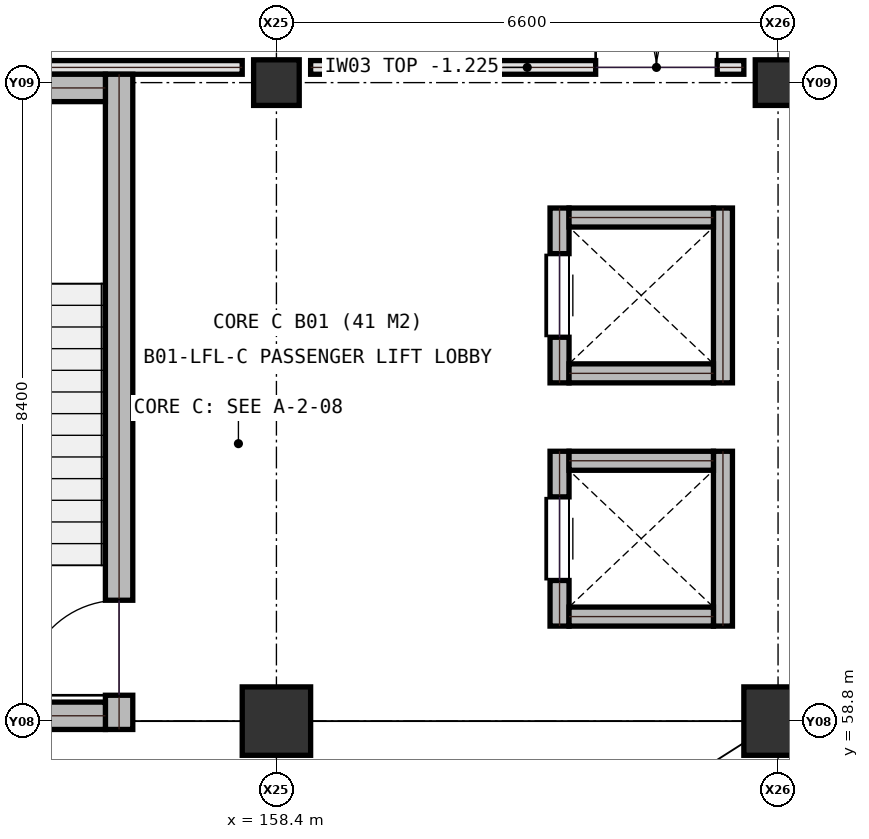
"""IFC4 building model, lengths in metres.
Left out: names, types, materials, properties, quantities, classifications, styles, units other than length and angle.
Written with IfcOpenShell. Run it as: python <this file> out.ifc"""

import sys

from ifc_helpers import new_model, si_unit, direction, frame, frame_2d, origin, origin_2d, place, context, subcontext, project, spatial, rectangle, extrude, element, fill, save


model = new_model("IFC4")
c1 = context("Model", 3, precision=1e-05, world=origin(), true_north=direction((0.0, 1.0)))
c2 = subcontext(c1, "Body", "Model", "MODEL_VIEW")
j1 = project(units=[si_unit("LENGTHUNIT", "METRE"), si_unit("PLANEANGLEUNIT", "RADIAN")], contexts=[c1])
p1 = place(None, origin())
s1 = spatial("IfcSite", under=j1, at=p1, CompositionType="ELEMENT")
p2 = place(p1, origin())
s2 = spatial("IfcBuilding", under=s1, at=p2, CompositionType="ELEMENT")
p3 = place(p2, frame((0.0, 0.0, -4.5)))
s3 = spatial("IfcBuildingStorey", under=s2, at=p3, CompositionType="ELEMENT", Elevation=-4.5)
p4 = place(p3, frame((158.4, 58.8, 0.0), z_axis=(0.0, 0.0, 1.0), x_axis=(1.0, 0.0, 0.0)))
e1 = element("IfcColumn", 1, at=p4, inside=s3, PredefinedType="COLUMN", context=c2, shape_type="SweptSolid", body=[
    extrude(rectangle(XDim=0.9, YDim=0.9, at=origin_2d()), origin(), (0.0, 0.0, 1.0), 4.5),
])
p5 = place(p3, frame((158.4, 67.2, 0.0), z_axis=(0.0, 0.0, 1.0), x_axis=(1.0, 0.0, 0.0)))
e2 = element("IfcColumn", 2, at=p5, inside=s3, PredefinedType="COLUMN", context=c2, shape_type="SweptSolid", body=[
    extrude(rectangle(XDim=0.6, YDim=0.6, at=origin_2d()), origin(), (0.0, 0.0, 1.0), 4.5),
])
p6 = place(p3, frame((165.0, 58.8, 0.0), z_axis=(0.0, 0.0, 1.0), x_axis=(1.0, 0.0, 0.0)))
e3 = element("IfcColumn", 3, at=p6, inside=s3, PredefinedType="COLUMN", context=c2, shape_type="SweptSolid", body=[
    extrude(rectangle(XDim=0.9, YDim=0.9, at=origin_2d()), origin(), (0.0, 0.0, 1.0), 4.5),
])
p7 = place(p3, frame((165.0, 67.2, 0.0), z_axis=(0.0, 0.0, 1.0), x_axis=(1.0, 0.0, 0.0)))
e4 = element("IfcColumn", 4, at=p7, inside=s3, PredefinedType="COLUMN", context=c2, shape_type="SweptSolid", body=[
    extrude(rectangle(XDim=0.6, YDim=0.6, at=origin_2d()), origin(), (0.0, 0.0, 1.0), 4.5),
])
p8 = place(p3, frame((152.0, 67.4, 0.0), z_axis=(0.0, 0.0, 1.0), x_axis=(1.0, 0.0, 0.0)))
e5 = element("IfcWall", 5, at=p8, inside=s3, PredefinedType="SOLIDWALL", context=c2, shape_type="SweptSolid", body=[
    extrude(rectangle(XDim=5.95, YDim=0.18, at=frame_2d((2.975, 0.0))), origin(), (0.0, 0.0, 1.0), 3.29),
])
p9 = place(p3, frame((158.85, 67.4, 0.0), z_axis=(0.0, 0.0, 1.0), x_axis=(1.0, 0.0, 0.0)))
e6 = element("IfcWall", 6, at=p9, inside=s3, PredefinedType="SOLIDWALL", context=c2, shape_type="SweptSolid", body=[
    extrude(rectangle(XDim=5.7, YDim=0.18, at=frame_2d((2.85, 0.0))), origin(), (0.0, 0.0, 1.0), 3.275),
])
p10 = place(p9, frame((3.75, 0.0, 0.0)))
e7 = element("IfcOpeningElement", 7, at=p10, cuts=e6, PredefinedType="OPENING", context=c2, shape_type="SweptSolid", body=[
    extrude(rectangle(XDim=1.6, YDim=2.2, at=frame_2d((0.8, 1.1))), frame((0.0, 0.1, 0.0), z_axis=(0.0, -1.0, 0.0), x_axis=(1.0, 0.0, 0.0)), (0.0, 0.0, 1.0), 0.2),
])
p11 = place(p3, frame((156.33, 58.69, 0.0), z_axis=(0.0, 0.0, 1.0), x_axis=(0.0, 1.0, 0.0)))
e8 = element("IfcWall", 8, at=p11, inside=s3, PredefinedType="SHEAR", context=c2, shape_type="SweptSolid", body=[
    extrude(rectangle(XDim=8.62, YDim=0.36, at=frame_2d((4.31, 0.0))), origin(), (0.0, 0.0, 1.0), 4.14),
])
p12 = place(p11, frame((0.45, 0.0, 0.0)))
e9 = element("IfcOpeningElement", 9, at=p12, cuts=e8, PredefinedType="OPENING", context=c2, shape_type="SweptSolid", body=[
    extrude(rectangle(XDim=1.25, YDim=2.15, at=frame_2d((0.625, 1.075))), frame((0.0, 0.19, 0.0), z_axis=(0.0, -1.0, 0.0), x_axis=(1.0, 0.0, 0.0)), (0.0, 0.0, 1.0), 0.38),
])
for number, where, z_axis, x_axis in (
    (10, (152.35, 67.13, 0.0), (0.0, 0.0, 1.0), (1.0, 0.0, 0.0)),
    (11, (152.35, 58.87, 0.0), (0.0, 0.0, 1.0), (1.0, 0.0, 0.0)),
):
    element("IfcWall", number, at=place(p3, frame(where, z_axis=z_axis, x_axis=x_axis)), inside=s3, PredefinedType="SHEAR", context=c2, shape_type="SweptSolid", body=[
        extrude(rectangle(XDim=3.8, YDim=0.36, at=frame_2d((1.9, 0.0))), origin(), (0.0, 0.0, 1.0), 4.14),
    ])
p13 = place(p3, frame((162.125, 60.05, 0.0), z_axis=(0.0, 0.0, 1.0), x_axis=(0.0, 1.0, 0.0)))
e12 = element("IfcWall", 12, at=p13, inside=s3, PredefinedType="SHEAR", context=c2, shape_type="SweptSolid", body=[
    extrude(rectangle(XDim=2.3, YDim=0.25, at=frame_2d((1.15, 0.0))), origin(), (0.0, 0.0, 1.0), 4.14),
])
p14 = place(p13, frame((0.6, 0.0, 0.0)))
e13 = element("IfcOpeningElement", 13, at=p14, cuts=e12, PredefinedType="OPENING", context=c2, shape_type="SweptSolid", body=[
    extrude(rectangle(XDim=1.1, YDim=2.15, at=frame_2d((0.55, 1.075))), frame((0.0, 0.135, 0.0), z_axis=(0.0, -1.0, 0.0), x_axis=(1.0, 0.0, 0.0)), (0.0, 0.0, 1.0), 0.27),
])
p15 = place(p3, frame((164.275, 60.05, 0.0), z_axis=(0.0, 0.0, 1.0), x_axis=(0.0, 1.0, 0.0)))
e14 = element("IfcWall", 14, at=p15, inside=s3, PredefinedType="SHEAR", context=c2, shape_type="SweptSolid", body=[
    extrude(rectangle(XDim=2.3, YDim=0.25, at=frame_2d((1.15, 0.0))), origin(), (0.0, 0.0, 1.0), 4.14),
])
for number, where, z_axis, x_axis in (
    (15, (162.25, 60.175, 0.0), (0.0, 0.0, 1.0), (1.0, 0.0, 0.0)),
    (16, (162.25, 62.225, 0.0), (0.0, 0.0, 1.0), (1.0, 0.0, 0.0)),
):
    element("IfcWall", number, at=place(p3, frame(where, z_axis=z_axis, x_axis=x_axis)), inside=s3, PredefinedType="SHEAR", context=c2, shape_type="SweptSolid", body=[
        extrude(rectangle(XDim=1.9, YDim=0.25, at=frame_2d((0.95, 0.0))), origin(), (0.0, 0.0, 1.0), 4.14),
    ])
p16 = place(p3, frame((162.125, 63.25, 0.0), z_axis=(0.0, 0.0, 1.0), x_axis=(0.0, 1.0, 0.0)))
e17 = element("IfcWall", 17, at=p16, inside=s3, PredefinedType="SHEAR", context=c2, shape_type="SweptSolid", body=[
    extrude(rectangle(XDim=2.3, YDim=0.25, at=frame_2d((1.15, 0.0))), origin(), (0.0, 0.0, 1.0), 4.14),
])
p17 = place(p16, frame((0.6, 0.0, 0.0)))
e18 = element("IfcOpeningElement", 18, at=p17, cuts=e17, PredefinedType="OPENING", context=c2, shape_type="SweptSolid", body=[
    extrude(rectangle(XDim=1.1, YDim=2.15, at=frame_2d((0.55, 1.075))), frame((0.0, 0.135, 0.0), z_axis=(0.0, -1.0, 0.0), x_axis=(1.0, 0.0, 0.0)), (0.0, 0.0, 1.0), 0.27),
])
p18 = place(p3, frame((164.275, 63.25, 0.0), z_axis=(0.0, 0.0, 1.0), x_axis=(0.0, 1.0, 0.0)))
e19 = element("IfcWall", 19, at=p18, inside=s3, PredefinedType="SHEAR", context=c2, shape_type="SweptSolid", body=[
    extrude(rectangle(XDim=2.3, YDim=0.25, at=frame_2d((1.15, 0.0))), origin(), (0.0, 0.0, 1.0), 4.14),
])
for number, where, z_axis, x_axis in (
    (20, (162.25, 63.375, 0.0), (0.0, 0.0, 1.0), (1.0, 0.0, 0.0)),
    (21, (162.25, 65.425, 0.0), (0.0, 0.0, 1.0), (1.0, 0.0, 0.0)),
):
    element("IfcWall", number, at=place(p3, frame(where, z_axis=z_axis, x_axis=x_axis)), inside=s3, PredefinedType="SHEAR", context=c2, shape_type="SweptSolid", body=[
        extrude(rectangle(XDim=1.9, YDim=0.25, at=frame_2d((0.95, 0.0))), origin(), (0.0, 0.0, 1.0), 4.14),
    ])
p19 = place(p10, origin())
e22 = element("IfcDoor", 22, at=p19, inside=s3, OperationType="DOUBLE_DOOR_SINGLE_SWING", PredefinedType="DOOR", context=c2, shape_type="SweptSolid", body=[
    extrude(rectangle(XDim=1.6, YDim=2.2, at=frame_2d((0.8, 1.1))), frame((0.0, 0.025, 0.0), z_axis=(0.0, -1.0, 0.0), x_axis=(1.0, 0.0, 0.0)), (0.0, 0.0, 1.0), 0.05),
])
fill(e7, e22)
p20 = place(p12, origin())
e23 = element("IfcDoor", 23, at=p20, inside=s3, OperationType="SINGLE_SWING_LEFT", PredefinedType="DOOR", context=c2, shape_type="SweptSolid", body=[
    extrude(rectangle(XDim=1.25, YDim=2.15, at=frame_2d((0.625, 1.075))), frame((0.0, 0.025, 0.0), z_axis=(0.0, -1.0, 0.0), x_axis=(1.0, 0.0, 0.0)), (0.0, 0.0, 1.0), 0.05),
])
fill(e9, e23)
p21 = place(p14, origin())
e24 = element("IfcDoor", 24, at=p21, inside=s3, OperationType="SLIDING_TO_LEFT", PredefinedType="DOOR", context=c2, shape_type="SweptSolid", body=[
    extrude(rectangle(XDim=1.1, YDim=2.15, at=frame_2d((0.55, 1.075))), frame((0.0, 0.025, 0.0), z_axis=(0.0, -1.0, 0.0), x_axis=(1.0, 0.0, 0.0)), (0.0, 0.0, 1.0), 0.05),
])
fill(e13, e24)
p22 = place(p17, origin())
e25 = element("IfcDoor", 25, at=p22, inside=s3, OperationType="SLIDING_TO_LEFT", PredefinedType="DOOR", context=c2, shape_type="SweptSolid", body=[
    extrude(rectangle(XDim=1.1, YDim=2.15, at=frame_2d((0.55, 1.075))), frame((0.0, 0.025, 0.0), z_axis=(0.0, -1.0, 0.0), x_axis=(1.0, 0.0, 0.0)), (0.0, 0.0, 1.0), 0.05),
])
fill(e18, e25)
save(model, sys.argv[1])
